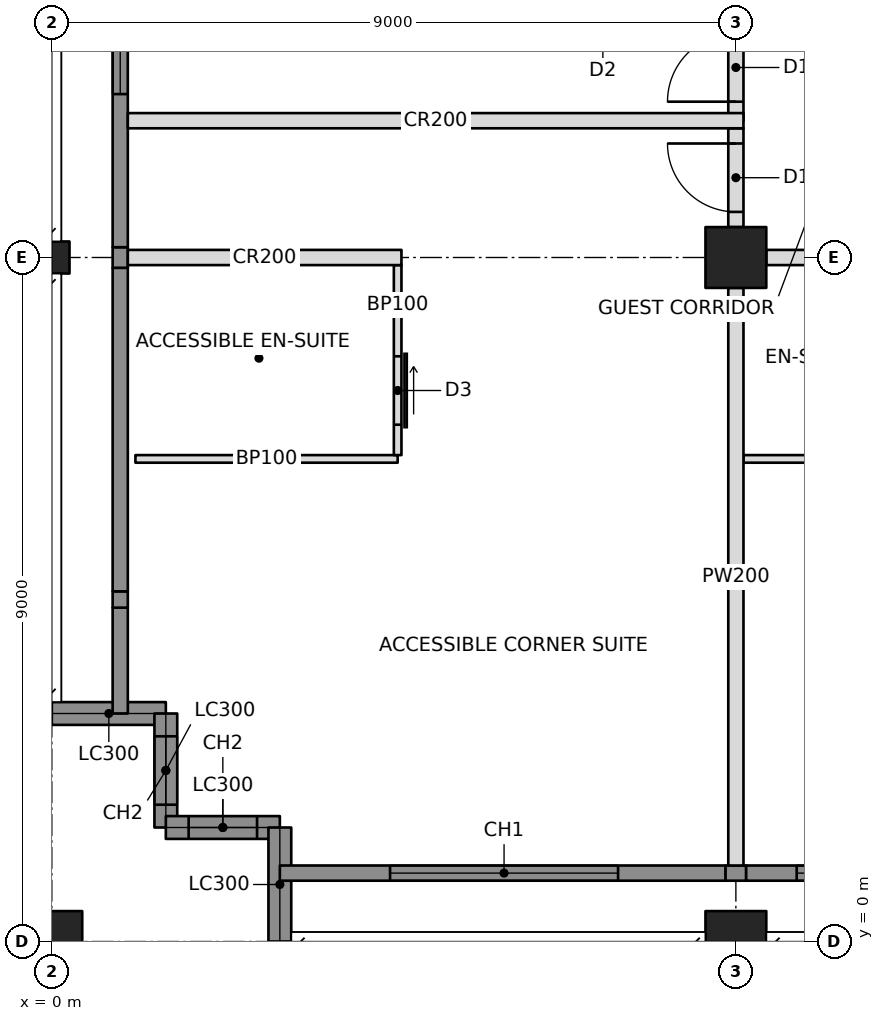
"""IFC4 building model, lengths in metres.
Left out: names, types, materials, properties, quantities, classifications, styles, units other than length and angle.
Written with IfcOpenShell. Run it as: python <this file> out.ifc"""

import sys

from ifc_helpers import new_model, si_unit, direction, frame, frame_2d, origin, origin_with_axes, origin_2d, place, context, subcontext, project, spatial, rectangle, hollow_rectangle, i_section, extrude, element, fill, save


model = new_model("IFC4")
c1 = context("Model", 3, precision=1e-05, world=origin(), true_north=direction((0.0, 1.0)))
c2 = subcontext(c1, "Body", "Model", "MODEL_VIEW")
j1 = project(units=[si_unit("LENGTHUNIT", "METRE"), si_unit("PLANEANGLEUNIT", "RADIAN")], contexts=[c1])
p1 = place(None, origin())
s1 = spatial("IfcSite", under=j1, at=p1, CompositionType="ELEMENT")
p2 = place(p1, origin())
s2 = spatial("IfcBuilding", under=s1, at=p2, CompositionType="ELEMENT")
p3 = place(p2, frame((0.0, 0.0, 233.8)))
s3 = spatial("IfcBuildingStorey", under=s2, at=p3, CompositionType="ELEMENT", Elevation=233.8)
p4 = place(p3, origin_with_axes())
e1 = element("IfcColumn", 1, at=p4, inside=s3, PredefinedType="COLUMN", context=c2, shape_type="SweptSolid", body=[
    extrude(hollow_rectangle(XDim=0.8, YDim=0.8, WallThickness=0.05, at=origin_2d()), origin(), (0.0, 0.0, 1.0), 3.6),
])
p5 = place(p3, frame((0.0, 9.0, 0.0), z_axis=(0.0, 0.0, 1.0), x_axis=(0.0, 1.0, 0.0)))
e2 = element("IfcColumn", 2, at=p5, inside=s3, PredefinedType="COLUMN", context=c2, shape_type="SweptSolid", body=[
    extrude(i_section(OverallWidth=0.422, OverallDepth=0.465, WebThickness=0.045, FlangeThickness=0.073, at=origin_2d()), origin(), (0.0, 0.0, 1.0), 3.6),
])
p6 = place(p3, frame((9.0, 0.0, 0.0), z_axis=(0.0, 0.0, 1.0), x_axis=(1.0, 0.0, 0.0)))
e3 = element("IfcColumn", 3, at=p6, inside=s3, PredefinedType="COLUMN", context=c2, shape_type="SweptSolid", body=[
    extrude(hollow_rectangle(XDim=0.8, YDim=0.8, WallThickness=0.05, at=origin_2d()), origin(), (0.0, 0.0, 1.0), 3.6),
])
p7 = place(p3, frame((9.0, 9.0, 0.0), z_axis=(0.0, 0.0, 1.0), x_axis=(1.0, 0.0, 0.0)))
e4 = element("IfcColumn", 4, at=p7, inside=s3, PredefinedType="COLUMN", context=c2, shape_type="SweptSolid", body=[
    extrude(hollow_rectangle(XDim=0.8, YDim=0.8, WallThickness=0.04, at=origin_2d()), origin(), (0.0, 0.0, 1.0), 3.6),
])
p8 = place(p3, frame((0.0, 3.0, 0.0), z_axis=(0.0, 0.0, 1.0), x_axis=(1.0, 0.0, 0.0)))
e5 = element("IfcWall", 5, at=p8, inside=s3, PredefinedType="SOLIDWALL", context=c2, shape_type="SweptSolid", body=[
    extrude(rectangle(XDim=1.5, YDim=0.3, at=frame_2d((0.75, 0.0))), origin(), (0.0, 0.0, 1.0), 2.62),
])
p9 = place(p3, frame((1.5, 3.0, 0.0), z_axis=(0.0, 0.0, 1.0), x_axis=(0.0, -1.0, 0.0)))
e6 = element("IfcWall", 6, at=p9, inside=s3, PredefinedType="SOLIDWALL", context=c2, shape_type="SweptSolid", body=[
    extrude(rectangle(XDim=1.5, YDim=0.3, at=frame_2d((0.75, 0.0))), origin(), (0.0, 0.0, 1.0), 3.4),
])
p10 = place(p9, frame((0.3, 0.0, 0.6)))
e7 = element("IfcOpeningElement", 7, at=p10, cuts=e6, PredefinedType="OPENING", context=c2, shape_type="SweptSolid", body=[
    extrude(rectangle(XDim=0.9, YDim=2.2, at=frame_2d((0.45, 1.1))), frame((0.0, 0.16, 0.0), z_axis=(0.0, -1.0, 0.0), x_axis=(1.0, 0.0, 0.0)), (0.0, 0.0, 1.0), 0.32),
])
p11 = place(p3, frame((1.5, 1.5, 0.0), z_axis=(0.0, 0.0, 1.0), x_axis=(1.0, 0.0, 0.0)))
e8 = element("IfcWall", 8, at=p11, inside=s3, PredefinedType="SOLIDWALL", context=c2, shape_type="SweptSolid", body=[
    extrude(rectangle(XDim=1.5, YDim=0.3, at=frame_2d((0.75, 0.0))), origin(), (0.0, 0.0, 1.0), 3.4),
])
p12 = place(p11, frame((0.3, 0.0, 0.6)))
e9 = element("IfcOpeningElement", 9, at=p12, cuts=e8, PredefinedType="OPENING", context=c2, shape_type="SweptSolid", body=[
    extrude(rectangle(XDim=0.9, YDim=2.2, at=frame_2d((0.45, 1.1))), frame((0.0, 0.16, 0.0), z_axis=(0.0, -1.0, 0.0), x_axis=(1.0, 0.0, 0.0)), (0.0, 0.0, 1.0), 0.32),
])
p13 = place(p3, frame((3.0, 1.5, 0.0), z_axis=(0.0, 0.0, 1.0), x_axis=(0.0, -1.0, 0.0)))
e10 = element("IfcWall", 10, at=p13, inside=s3, PredefinedType="SOLIDWALL", context=c2, shape_type="SweptSolid", body=[
    extrude(rectangle(XDim=1.5, YDim=0.3, at=frame_2d((0.75, 0.0))), origin(), (0.0, 0.0, 1.0), 2.62),
])
p14 = place(p3, frame((3.0, 0.9, 0.0), z_axis=(0.0, 0.0, 1.0), x_axis=(1.0, 0.0, 0.0)))
e11 = element("IfcWall", 11, at=p14, inside=s3, PredefinedType="SOLIDWALL", context=c2, shape_type="SweptSolid", body=[
    extrude(rectangle(XDim=5.865, YDim=0.2, at=frame_2d((2.932, 0.0))), origin(), (0.0, 0.0, 1.0), 3.4),
])
p15 = place(p14, frame((1.45, 0.0, 0.6)))
e12 = element("IfcOpeningElement", 12, at=p15, cuts=e11, PredefinedType="OPENING", context=c2, shape_type="SweptSolid", body=[
    extrude(rectangle(XDim=3.0, YDim=2.2, at=frame_2d((1.5, 1.1))), frame((0.0, 0.11, 0.0), z_axis=(0.0, -1.0, 0.0), x_axis=(1.0, 0.0, 0.0)), (0.0, 0.0, 1.0), 0.22),
])
p16 = place(p3, frame((0.9, 3.0, 0.0), z_axis=(0.0, 0.0, 1.0), x_axis=(0.0, 1.0, 0.0)))
e13 = element("IfcWall", 13, at=p16, inside=s3, PredefinedType="SOLIDWALL", context=c2, shape_type="SweptSolid", body=[
    extrude(rectangle(XDim=1.393, YDim=0.2, at=frame_2d((0.696, 0.0))), origin(), (0.0, 0.0, 1.0), 3.4),
])
p17 = place(p3, frame((1.0, 9.0, 0.0), z_axis=(0.0, 0.0, 1.0), x_axis=(1.0, 0.0, 0.0)))
e14 = element("IfcWall", 14, at=p17, inside=s3, PredefinedType="PARTITIONING", context=c2, shape_type="SweptSolid", body=[
    extrude(rectangle(XDim=3.6, YDim=0.2, at=frame_2d((1.8, 0.0))), origin(), (0.0, 0.0, 1.0), 2.638),
])
p18 = place(p3, frame((9.4, 9.0, 0.0), z_axis=(0.0, 0.0, 1.0), x_axis=(1.0, 0.0, 0.0)))
e15 = element("IfcWall", 15, at=p18, inside=s3, PredefinedType="PARTITIONING", context=c2, shape_type="SweptSolid", body=[
    extrude(rectangle(XDim=8.2, YDim=0.2, at=frame_2d((4.1, 0.0))), origin(), (0.0, 0.0, 1.0), 2.605),
])
p19 = place(p18, frame((2.95, 0.0, 0.0)))
e16 = element("IfcOpeningElement", 16, at=p19, cuts=e15, PredefinedType="OPENING", context=c2, shape_type="SweptSolid", body=[
    extrude(rectangle(XDim=0.9, YDim=2.1, at=frame_2d((0.45, 1.05))), frame((0.0, 0.11, 0.0), z_axis=(0.0, -1.0, 0.0), x_axis=(1.0, 0.0, 0.0)), (0.0, 0.0, 1.0), 0.22),
])
p20 = place(p18, frame((4.35, 0.0, 0.0)))
e17 = element("IfcOpeningElement", 17, at=p20, cuts=e15, PredefinedType="OPENING", context=c2, shape_type="SweptSolid", body=[
    extrude(rectangle(XDim=0.9, YDim=2.1, at=frame_2d((0.45, 1.05))), frame((0.0, 0.11, 0.0), z_axis=(0.0, -1.0, 0.0), x_axis=(1.0, 0.0, 0.0)), (0.0, 0.0, 1.0), 0.22),
])
p21 = place(p3, frame((9.0, 10.8, 0.0), z_axis=(0.0, 0.0, 1.0), x_axis=(0.0, 1.0, 0.0)))
e18 = element("IfcWall", 18, at=p21, inside=s3, PredefinedType="PARTITIONING", context=c2, shape_type="SweptSolid", body=[
    extrude(rectangle(XDim=6.8, YDim=0.2, at=frame_2d((3.4, 0.0))), origin(), (0.0, 0.0, 1.0), 2.605),
])
p22 = place(p21, frame((0.25, 0.0, 0.0)))
e19 = element("IfcOpeningElement", 19, at=p22, cuts=e18, PredefinedType="OPENING", context=c2, shape_type="SweptSolid", body=[
    extrude(rectangle(XDim=0.9, YDim=2.1, at=frame_2d((0.45, 1.05))), frame((0.0, 0.11, 0.0), z_axis=(0.0, -1.0, 0.0), x_axis=(1.0, 0.0, 0.0)), (0.0, 0.0, 1.0), 0.22),
])
p23 = place(p21, frame((3.85, 0.0, 0.0)))
e20 = element("IfcOpeningElement", 20, at=p23, cuts=e18, PredefinedType="OPENING", context=c2, shape_type="SweptSolid", body=[
    extrude(rectangle(XDim=0.9, YDim=2.1, at=frame_2d((0.45, 1.05))), frame((0.0, 0.11, 0.0), z_axis=(0.0, -1.0, 0.0), x_axis=(1.0, 0.0, 0.0)), (0.0, 0.0, 1.0), 0.22),
])
p24 = place(p3, frame((1.0, 10.8, 0.0), z_axis=(0.0, 0.0, 1.0), x_axis=(1.0, 0.0, 0.0)))
e21 = element("IfcWall", 21, at=p24, inside=s3, PredefinedType="PARTITIONING", context=c2, shape_type="SweptSolid", body=[
    extrude(rectangle(XDim=8.1, YDim=0.2, at=frame_2d((4.05, 0.0))), origin(), (0.0, 0.0, 1.0), 2.604),
])
p25 = place(p3, frame((9.0, 8.6, 0.0), z_axis=(0.0, 0.0, 1.0), x_axis=(0.0, -1.0, 0.0)))
e22 = element("IfcWall", 22, at=p25, inside=s3, PredefinedType="PARTITIONING", context=c2, shape_type="SweptSolid", body=[
    extrude(rectangle(XDim=7.6, YDim=0.2, at=frame_2d((3.8, 0.0))), origin(), (0.0, 0.0, 1.0), 2.638),
])
p26 = place(p3, frame((1.1, 6.35, 0.0), z_axis=(0.0, 0.0, 1.0), x_axis=(1.0, 0.0, 0.0)))
e23 = element("IfcWall", 23, at=p26, inside=s3, PredefinedType="PARTITIONING", context=c2, shape_type="SweptSolid", body=[
    extrude(rectangle(XDim=3.45, YDim=0.1, at=frame_2d((1.725, 0.0))), origin(), (0.0, 0.0, 1.0), 3.4),
])
p27 = place(p3, frame((4.55, 8.9, 0.0), z_axis=(0.0, 0.0, 1.0), x_axis=(0.0, -1.0, 0.0)))
e24 = element("IfcWall", 24, at=p27, inside=s3, PredefinedType="PARTITIONING", context=c2, shape_type="SweptSolid", body=[
    extrude(rectangle(XDim=2.5, YDim=0.1, at=frame_2d((1.25, 0.0))), origin(), (0.0, 0.0, 1.0), 2.638),
])
p28 = place(p27, frame((1.2, 0.0, 0.0)))
e25 = element("IfcOpeningElement", 25, at=p28, cuts=e24, PredefinedType="OPENING", context=c2, shape_type="SweptSolid", body=[
    extrude(rectangle(XDim=0.9, YDim=2.1, at=frame_2d((0.45, 1.05))), frame((0.0, 0.06, 0.0), z_axis=(0.0, -1.0, 0.0), x_axis=(1.0, 0.0, 0.0)), (0.0, 0.0, 1.0), 0.12),
])
p29 = place(p3, frame((9.1, 6.35, 0.0), z_axis=(0.0, 0.0, 1.0), x_axis=(1.0, 0.0, 0.0)))
e26 = element("IfcWall", 26, at=p29, inside=s3, PredefinedType="PARTITIONING", context=c2, shape_type="SweptSolid", body=[
    extrude(rectangle(XDim=2.95, YDim=0.1, at=frame_2d((1.475, 0.0))), origin(), (0.0, 0.0, 1.0), 2.638),
])
p30 = place(p3, frame((9.0, 9.4, 0.0), z_axis=(0.0, 0.0, 1.0), x_axis=(0.0, 1.0, 0.0)))
e27 = element("IfcWall", 27, at=p30, inside=s3, PredefinedType="PARTITIONING", context=c2, shape_type="SweptSolid", body=[
    extrude(rectangle(XDim=1.3, YDim=0.2, at=frame_2d((0.65, 0.0))), origin(), (0.0, 0.0, 1.0), 2.605),
])
p31 = place(p30, frame((0.2, 0.0, 0.0)))
e28 = element("IfcOpeningElement", 28, at=p31, cuts=e27, PredefinedType="OPENING", context=c2, shape_type="SweptSolid", body=[
    extrude(rectangle(XDim=0.9, YDim=2.1, at=frame_2d((0.45, 1.05))), frame((0.0, 0.11, 0.0), z_axis=(0.0, -1.0, 0.0), x_axis=(1.0, 0.0, 0.0)), (0.0, 0.0, 1.0), 0.22),
])
p32 = place(p3, frame((8.865, 0.9, 0.0), z_axis=(0.0, 0.0, 1.0), x_axis=(1.0, 0.0, 0.0)))
e29 = element("IfcWall", 29, at=p32, inside=s3, PredefinedType="SOLIDWALL", context=c2, shape_type="SweptSolid", body=[
    extrude(rectangle(XDim=0.271, YDim=0.2, at=frame_2d((0.135, 0.0))), origin(), (0.0, 0.0, 1.0), 2.638),
])
p33 = place(p3, frame((9.135, 0.9, 0.0), z_axis=(0.0, 0.0, 1.0), x_axis=(1.0, 0.0, 0.0)))
e30 = element("IfcWall", 30, at=p33, inside=s3, PredefinedType="SOLIDWALL", context=c2, shape_type="SweptSolid", body=[
    extrude(rectangle(XDim=8.671, YDim=0.2, at=frame_2d((4.335, 0.0))), origin(), (0.0, 0.0, 1.0), 3.4),
])
p34 = place(p33, frame((0.665, 0.0, 0.6)))
e31 = element("IfcOpeningElement", 31, at=p34, cuts=e30, PredefinedType="OPENING", context=c2, shape_type="SweptSolid", body=[
    extrude(rectangle(XDim=3.0, YDim=2.2, at=frame_2d((1.5, 1.1))), frame((0.0, 0.11, 0.0), z_axis=(0.0, -1.0, 0.0), x_axis=(1.0, 0.0, 0.0)), (0.0, 0.0, 1.0), 0.22),
])
p35 = place(p33, frame((5.065, 0.0, 0.6)))
e32 = element("IfcOpeningElement", 32, at=p35, cuts=e30, PredefinedType="OPENING", context=c2, shape_type="SweptSolid", body=[
    extrude(rectangle(XDim=3.0, YDim=2.2, at=frame_2d((1.5, 1.1))), frame((0.0, 0.11, 0.0), z_axis=(0.0, -1.0, 0.0), x_axis=(1.0, 0.0, 0.0)), (0.0, 0.0, 1.0), 0.22),
])
p36 = place(p3, frame((0.9, 4.393, 0.0), z_axis=(0.0, 0.0, 1.0), x_axis=(0.0, 1.0, 0.0)))
e33 = element("IfcWall", 33, at=p36, inside=s3, PredefinedType="SOLIDWALL", context=c2, shape_type="SweptSolid", body=[
    extrude(rectangle(XDim=0.215, YDim=0.2, at=frame_2d((0.107, 0.0))), origin(), (0.0, 0.0, 1.0), 2.861),
])
p37 = place(p3, frame((0.9, 4.607, 0.0), z_axis=(0.0, 0.0, 1.0), x_axis=(0.0, 1.0, 0.0)))
e34 = element("IfcWall", 34, at=p37, inside=s3, PredefinedType="SOLIDWALL", context=c2, shape_type="SweptSolid", body=[
    extrude(rectangle(XDim=4.257, YDim=0.2, at=frame_2d((2.129, 0.0))), origin(), (0.0, 0.0, 1.0), 3.4),
])
p38 = place(p3, frame((0.9, 8.865, 0.0), z_axis=(0.0, 0.0, 1.0), x_axis=(0.0, 1.0, 0.0)))
e35 = element("IfcWall", 35, at=p38, inside=s3, PredefinedType="SOLIDWALL", context=c2, shape_type="SweptSolid", body=[
    extrude(rectangle(XDim=0.271, YDim=0.2, at=frame_2d((0.135, 0.0))), origin(), (0.0, 0.0, 1.0), 2.638),
])
p39 = place(p3, frame((0.9, 9.135, 0.0), z_axis=(0.0, 0.0, 1.0), x_axis=(0.0, 1.0, 0.0)))
e36 = element("IfcWall", 36, at=p39, inside=s3, PredefinedType="SOLIDWALL", context=c2, shape_type="SweptSolid", body=[
    extrude(rectangle(XDim=8.671, YDim=0.2, at=frame_2d((4.335, 0.0))), origin(), (0.0, 0.0, 1.0), 3.4),
])
p40 = place(p39, frame((2.015, 0.0, 0.6)))
e37 = element("IfcOpeningElement", 37, at=p40, cuts=e36, PredefinedType="OPENING", context=c2, shape_type="SweptSolid", body=[
    extrude(rectangle(XDim=3.0, YDim=2.2, at=frame_2d((1.5, 1.1))), frame((0.0, 0.11, 0.0), z_axis=(0.0, -1.0, 0.0), x_axis=(1.0, 0.0, 0.0)), (0.0, 0.0, 1.0), 0.22),
])
p41 = place(p39, frame((5.515, 0.0, 0.6)))
e38 = element("IfcOpeningElement", 38, at=p41, cuts=e36, PredefinedType="OPENING", context=c2, shape_type="SweptSolid", body=[
    extrude(rectangle(XDim=3.0, YDim=2.2, at=frame_2d((1.5, 1.1))), frame((0.0, 0.11, 0.0), z_axis=(0.0, -1.0, 0.0), x_axis=(1.0, 0.0, 0.0)), (0.0, 0.0, 1.0), 0.22),
])
p42 = place(p10, origin())
e39 = element("IfcWindow", 39, at=p42, inside=s3, PartitioningType="SINGLE_PANEL", PredefinedType="WINDOW", context=c2, shape_type="SweptSolid", body=[
    extrude(rectangle(XDim=0.9, YDim=2.2, at=frame_2d((0.45, 1.1))), frame((0.0, 0.03, 0.0), z_axis=(0.0, -1.0, 0.0), x_axis=(1.0, 0.0, 0.0)), (0.0, 0.0, 1.0), 0.06),
])
fill(e7, e39)
p43 = place(p12, origin())
e40 = element("IfcWindow", 40, at=p43, inside=s3, PartitioningType="SINGLE_PANEL", PredefinedType="WINDOW", context=c2, shape_type="SweptSolid", body=[
    extrude(rectangle(XDim=0.9, YDim=2.2, at=frame_2d((0.45, 1.1))), frame((0.0, 0.03, 0.0), z_axis=(0.0, -1.0, 0.0), x_axis=(1.0, 0.0, 0.0)), (0.0, 0.0, 1.0), 0.06),
])
fill(e9, e40)
p44 = place(p15, origin())
e41 = element("IfcWindow", 41, at=p44, inside=s3, PartitioningType="TRIPLE_PANEL_VERTICAL", PredefinedType="WINDOW", context=c2, shape_type="SweptSolid", body=[
    extrude(rectangle(XDim=3.0, YDim=2.2, at=frame_2d((1.5, 1.1))), frame((0.0, 0.03, 0.0), z_axis=(0.0, -1.0, 0.0), x_axis=(1.0, 0.0, 0.0)), (0.0, 0.0, 1.0), 0.06),
])
fill(e12, e41)
p45 = place(p34, origin())
e42 = element("IfcWindow", 42, at=p45, inside=s3, PartitioningType="TRIPLE_PANEL_VERTICAL", PredefinedType="WINDOW", context=c2, shape_type="SweptSolid", body=[
    extrude(rectangle(XDim=3.0, YDim=2.2, at=frame_2d((1.5, 1.1))), frame((0.0, 0.03, 0.0), z_axis=(0.0, -1.0, 0.0), x_axis=(1.0, 0.0, 0.0)), (0.0, 0.0, 1.0), 0.06),
])
fill(e31, e42)
p46 = place(p40, origin())
e43 = element("IfcWindow", 43, at=p46, inside=s3, PartitioningType="TRIPLE_PANEL_VERTICAL", PredefinedType="WINDOW", context=c2, shape_type="SweptSolid", body=[
    extrude(rectangle(XDim=3.0, YDim=2.2, at=frame_2d((1.5, 1.1))), frame((0.0, 0.03, 0.0), z_axis=(0.0, -1.0, 0.0), x_axis=(1.0, 0.0, 0.0)), (0.0, 0.0, 1.0), 0.06),
])
fill(e37, e43)
p47 = place(p28, origin())
e44 = element("IfcDoor", 44, at=p47, inside=s3, OperationType="SLIDING_TO_LEFT", PredefinedType="DOOR", context=c2, shape_type="SweptSolid", body=[
    extrude(rectangle(XDim=0.9, YDim=2.1, at=frame_2d((0.45, 1.05))), frame((0.0, 0.025, 0.0), z_axis=(0.0, -1.0, 0.0), x_axis=(1.0, 0.0, 0.0)), (0.0, 0.0, 1.0), 0.05),
])
fill(e25, e44)
p48 = place(p22, origin())
e45 = element("IfcDoor", 45, at=p48, inside=s3, OperationType="SINGLE_SWING_LEFT", PredefinedType="DOOR", context=c2, shape_type="SweptSolid", body=[
    extrude(rectangle(XDim=0.9, YDim=2.1, at=frame_2d((0.45, 1.05))), frame((0.0, 0.025, 0.0), z_axis=(0.0, -1.0, 0.0), x_axis=(1.0, 0.0, 0.0)), (0.0, 0.0, 1.0), 0.05),
])
fill(e19, e45)
p49 = place(p31, origin())
e46 = element("IfcDoor", 46, at=p49, inside=s3, OperationType="SINGLE_SWING_RIGHT", PredefinedType="DOOR", context=c2, shape_type="SweptSolid", body=[
    extrude(rectangle(XDim=0.9, YDim=2.1, at=frame_2d((0.45, 1.05))), frame((0.0, 0.025, 0.0), z_axis=(0.0, -1.0, 0.0), x_axis=(1.0, 0.0, 0.0)), (0.0, 0.0, 1.0), 0.05),
])
fill(e28, e46)
save(model, sys.argv[1])
